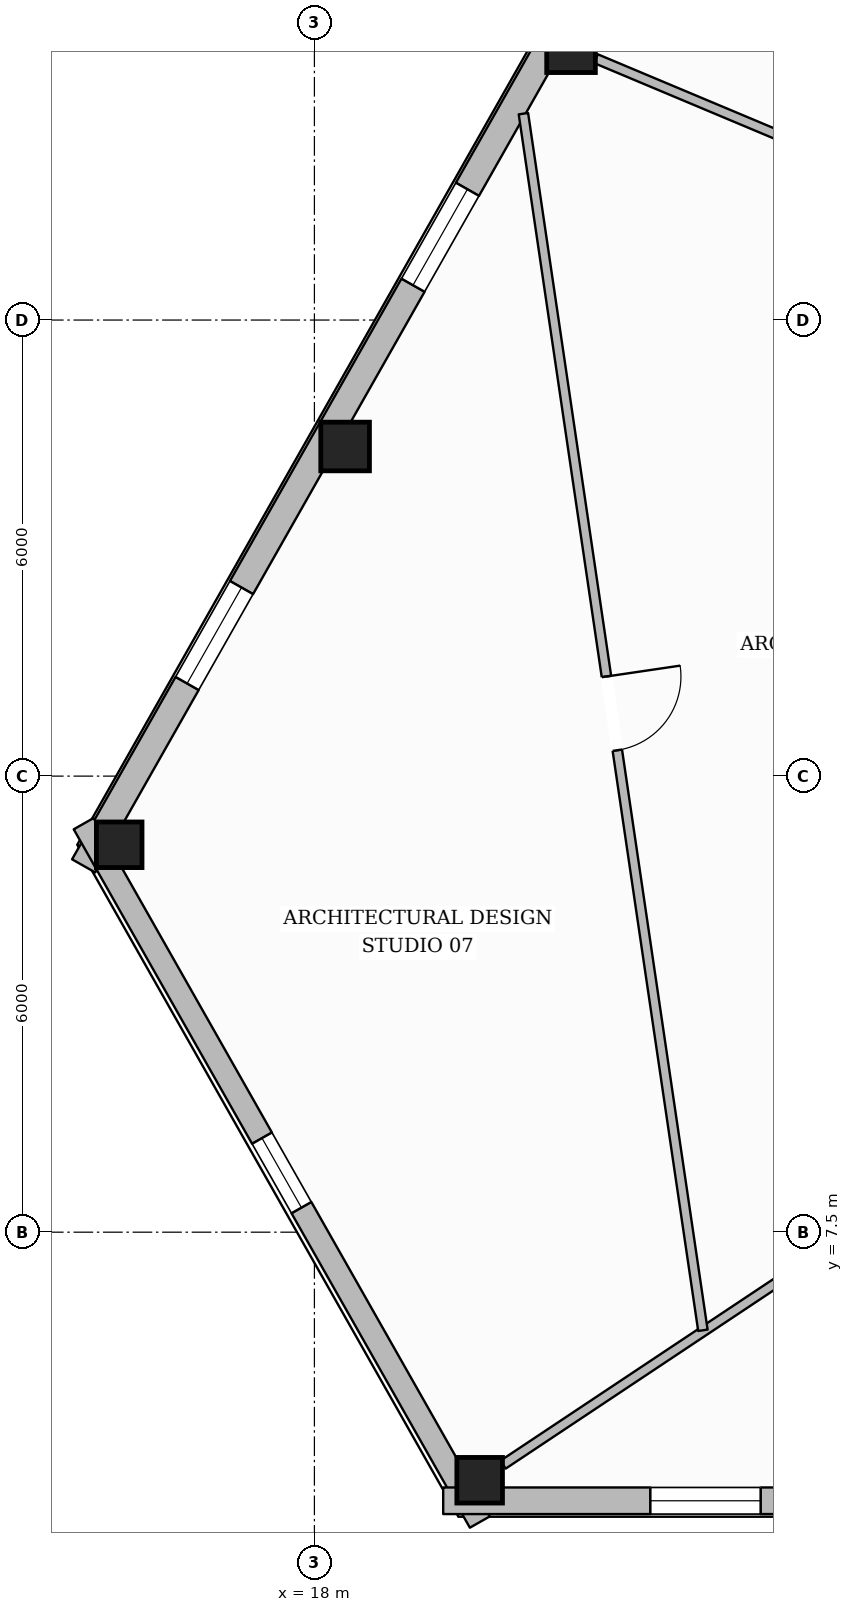
"""IFC4 building model, lengths in metres.
Left out: names, types, materials, properties, quantities, classifications, styles, units other than length and angle.
Written with IfcOpenShell. Run it as: python <this file> out.ifc"""

import sys

from ifc_helpers import new_model, si_unit, direction, frame, frame_2d, origin, origin_2d, place, context, subcontext, project, spatial, rectangle, hollow_rectangle, extrude, element, fill, save


model = new_model("IFC4")
c1 = context("Model", 3, precision=1e-05, world=origin(), true_north=direction((0.0, 1.0)))
c2 = subcontext(c1, "Body", "Model", "MODEL_VIEW")
j1 = project(units=[si_unit("LENGTHUNIT", "METRE"), si_unit("PLANEANGLEUNIT", "RADIAN")], contexts=[c1])
p1 = place(None, origin())
s1 = spatial("IfcSite", under=j1, at=p1, CompositionType="ELEMENT")
p2 = place(p1, origin())
s2 = spatial("IfcBuilding", under=s1, at=p2, CompositionType="ELEMENT")
p3 = place(p2, frame((0.0, 0.0, 165.0)))
s3 = spatial("IfcBuildingStorey", under=s2, at=p3, CompositionType="ELEMENT", Elevation=165.0)
for number, where, z_axis, x_axis in (
    (1, (21.376, 23.076, 0.0), (0.0, 0.0, 1.0), (1.0, 0.0, 0.0)),
    (2, (18.404, 17.836, 0.0), (0.0, 0.0, 1.0), (1.0, 0.0, 0.0)),
):
    element("IfcColumn", number, at=place(p3, frame(where, z_axis=z_axis, x_axis=x_axis)), inside=s3, PredefinedType="COLUMN", context=c2, shape_type="SweptSolid", body=[
        extrude(hollow_rectangle(XDim=0.64, YDim=0.64, WallThickness=0.028, at=origin_2d()), origin(), (0.0, 0.0, 1.0), 3.6),
    ])
for number, where, z_axis, x_axis in (
    (3, (15.432, 12.597, 0.0), (0.0, 0.0, 1.0), (1.0, 0.0, 0.0)),
    (4, (20.174, 4.237, 0.0), (0.0, 0.0, 1.0), (1.0, 0.0, 0.0)),
):
    element("IfcColumn", number, at=place(p3, frame(where, z_axis=z_axis, x_axis=x_axis)), inside=s3, PredefinedType="COLUMN", context=c2, shape_type="SweptSolid", body=[
        extrude(hollow_rectangle(XDim=0.6, YDim=0.6, WallThickness=0.028, at=origin_2d()), origin(), (0.0, 0.0, 1.0), 3.6),
    ])
p4 = place(p3, frame((14.964, 12.319, 0.0), z_axis=(0.0, 0.0, 1.0), x_axis=(0.493387150796, 0.869809817966, 0.0)))
e5 = element("IfcWall", 5, at=p4, inside=s3, PredefinedType="STANDARD", context=c2, shape_type="SweptSolid", body=[
    extrude(rectangle(XDim=37.096, YDim=0.35, at=frame_2d((18.548, 0.0))), origin(), (0.0, 0.0, 1.0), 3.132),
])
p5 = place(p4, frame((32.879, 0.0, 0.65)))
e6 = element("IfcOpeningElement", 6, at=p5, cuts=e5, PredefinedType="OPENING", context=c2, shape_type="SweptSolid", body=[
    extrude(rectangle(XDim=1.45, YDim=1.75, at=frame_2d((0.725, 0.875))), frame((0.0, 0.185, 0.0), z_axis=(0.0, -1.0, 0.0), x_axis=(1.0, 0.0, 0.0)), (0.0, 0.0, 1.0), 0.37),
])
p6 = place(p4, frame((26.855, 0.0, 0.65)))
e7 = element("IfcOpeningElement", 7, at=p6, cuts=e5, PredefinedType="OPENING", context=c2, shape_type="SweptSolid", body=[
    extrude(rectangle(XDim=1.45, YDim=1.75, at=frame_2d((0.725, 0.875))), frame((0.0, 0.185, 0.0), z_axis=(0.0, -1.0, 0.0), x_axis=(1.0, 0.0, 0.0)), (0.0, 0.0, 1.0), 0.37),
])
p7 = place(p4, frame((14.807, 0.0, 0.65)))
e8 = element("IfcOpeningElement", 8, at=p7, cuts=e5, PredefinedType="OPENING", context=c2, shape_type="SweptSolid", body=[
    extrude(rectangle(XDim=1.45, YDim=1.75, at=frame_2d((0.725, 0.875))), frame((0.0, 0.185, 0.0), z_axis=(0.0, -1.0, 0.0), x_axis=(1.0, 0.0, 0.0)), (0.0, 0.0, 1.0), 0.37),
])
p8 = place(p4, frame((8.783, 0.0, 0.65)))
e9 = element("IfcOpeningElement", 9, at=p8, cuts=e5, PredefinedType="OPENING", context=c2, shape_type="SweptSolid", body=[
    extrude(rectangle(XDim=1.45, YDim=1.75, at=frame_2d((0.725, 0.875))), frame((0.0, 0.185, 0.0), z_axis=(0.0, -1.0, 0.0), x_axis=(1.0, 0.0, 0.0)), (0.0, 0.0, 1.0), 0.37),
])
p9 = place(p4, frame((2.759, 0.0, 0.65)))
e10 = element("IfcOpeningElement", 10, at=p9, cuts=e5, PredefinedType="OPENING", context=c2, shape_type="SweptSolid", body=[
    extrude(rectangle(XDim=1.45, YDim=1.75, at=frame_2d((0.725, 0.875))), frame((0.0, 0.185, 0.0), z_axis=(0.0, -1.0, 0.0), x_axis=(1.0, 0.0, 0.0)), (0.0, 0.0, 1.0), 0.37),
])
p10 = place(p3, frame((20.176, 3.686, 0.0), z_axis=(0.0, 0.0, 1.0), x_axis=(-0.493371164069, 0.869818886013, 0.0)))
e11 = element("IfcWall", 11, at=p10, inside=s3, PredefinedType="STANDARD", context=c2, shape_type="SweptSolid", body=[
    extrude(rectangle(XDim=10.563, YDim=0.3, at=frame_2d((5.282, 0.0))), origin(), (0.0, 0.0, 1.0), 3.132),
])
p11 = place(p10, frame((4.757, 0.0, 0.65)))
e12 = element("IfcOpeningElement", 12, at=p11, cuts=e11, PredefinedType="OPENING", context=c2, shape_type="SweptSolid", body=[
    extrude(rectangle(XDim=1.05, YDim=1.7, at=frame_2d((0.525, 0.85))), frame((0.0, 0.16, 0.0), z_axis=(0.0, -1.0, 0.0), x_axis=(1.0, 0.0, 0.0)), (0.0, 0.0, 1.0), 0.32),
])
p12 = place(p3, frame((56.305, 3.967, 0.0), z_axis=(0.0, 0.0, 1.0), x_axis=(-1.0, 0.0, 0.0)))
e13 = element("IfcWall", 13, at=p12, inside=s3, PredefinedType="STANDARD", context=c2, shape_type="SweptSolid", body=[
    extrude(rectangle(XDim=36.611, YDim=0.35, at=frame_2d((18.305, 0.0))), origin(), (0.0, 0.0, 1.0), 3.132),
])
p13 = place(p12, frame((32.435, 0.0, 0.65)))
e14 = element("IfcOpeningElement", 14, at=p13, cuts=e13, PredefinedType="OPENING", context=c2, shape_type="SweptSolid", body=[
    extrude(rectangle(XDim=1.45, YDim=1.75, at=frame_2d((0.725, 0.875))), frame((0.0, 0.185, 0.0), z_axis=(0.0, -1.0, 0.0), x_axis=(1.0, 0.0, 0.0)), (0.0, 0.0, 1.0), 0.37),
])
p14 = place(p12, frame((26.493, 0.0, 0.65)))
e15 = element("IfcOpeningElement", 15, at=p14, cuts=e13, PredefinedType="OPENING", context=c2, shape_type="SweptSolid", body=[
    extrude(rectangle(XDim=1.45, YDim=1.75, at=frame_2d((0.725, 0.875))), frame((0.0, 0.185, 0.0), z_axis=(0.0, -1.0, 0.0), x_axis=(1.0, 0.0, 0.0)), (0.0, 0.0, 1.0), 0.37),
])
p15 = place(p12, frame((14.61, 0.0, 0.65)))
e16 = element("IfcOpeningElement", 16, at=p15, cuts=e13, PredefinedType="OPENING", context=c2, shape_type="SweptSolid", body=[
    extrude(rectangle(XDim=1.45, YDim=1.75, at=frame_2d((0.725, 0.875))), frame((0.0, 0.185, 0.0), z_axis=(0.0, -1.0, 0.0), x_axis=(1.0, 0.0, 0.0)), (0.0, 0.0, 1.0), 0.37),
])
p16 = place(p12, frame((8.667, 0.0, 0.65)))
e17 = element("IfcOpeningElement", 17, at=p16, cuts=e13, PredefinedType="OPENING", context=c2, shape_type="SweptSolid", body=[
    extrude(rectangle(XDim=1.45, YDim=1.75, at=frame_2d((0.725, 0.875))), frame((0.0, 0.185, 0.0), z_axis=(0.0, -1.0, 0.0), x_axis=(1.0, 0.0, 0.0)), (0.0, 0.0, 1.0), 0.37),
])
p17 = place(p12, frame((2.726, 0.0, 0.65)))
e18 = element("IfcOpeningElement", 18, at=p17, cuts=e13, PredefinedType="OPENING", context=c2, shape_type="SweptSolid", body=[
    extrude(rectangle(XDim=1.45, YDim=1.75, at=frame_2d((0.725, 0.875))), frame((0.0, 0.185, 0.0), z_axis=(0.0, -1.0, 0.0), x_axis=(1.0, 0.0, 0.0)), (0.0, 0.0, 1.0), 0.37),
])
p18 = place(p3, frame((25.979, 21.144, 0.0), z_axis=(0.0, 0.0, 1.0), x_axis=(-0.922095611861, 0.38696212035, 0.0)))
e19 = element("IfcWall", 19, at=p18, inside=s3, PredefinedType="PARTITIONING", context=c2, shape_type="SweptSolid", body=[
    extrude(rectangle(XDim=4.637, YDim=0.125, at=frame_2d((2.318, 0.0))), origin(), (0.0, 0.0, 1.0), 3.6),
])
p19 = place(p3, frame((25.979, 8.1, 0.0), z_axis=(0.0, 0.0, 1.0), x_axis=(-0.832482321267, -0.554051608407, 0.0)))
e20 = element("IfcWall", 20, at=p19, inside=s3, PredefinedType="PARTITIONING", context=c2, shape_type="SweptSolid", body=[
    extrude(rectangle(XDim=6.604, YDim=0.125, at=frame_2d((3.302, 0.0))), origin(), (0.0, 0.0, 1.0), 3.141),
])
p20 = place(p3, frame((20.75, 22.215, 0.0), z_axis=(0.0, 0.0, 1.0), x_axis=(0.145949252276, -0.989292078084, 0.0)))
e21 = element("IfcWall", 21, at=p20, inside=s3, PredefinedType="PARTITIONING", context=c2, shape_type="SweptSolid", body=[
    extrude(rectangle(XDim=16.179, YDim=0.125, at=frame_2d((8.09, 0.0))), origin(), (0.0, 0.0, 1.0), 3.339),
])
p21 = place(p20, frame((7.485, 0.0, 0.0)))
e22 = element("IfcOpeningElement", 22, at=p21, cuts=e21, PredefinedType="OPENING", context=c2, shape_type="SweptSolid", body=[
    extrude(rectangle(XDim=0.98, YDim=2.15, at=frame_2d((0.49, 1.075))), frame((0.0, 0.073, 0.0), z_axis=(0.0, -1.0, 0.0), x_axis=(1.0, 0.0, 0.0)), (0.0, 0.0, 1.0), 0.145),
])
p22 = place(p8, origin())
e23 = element("IfcWindow", 23, at=p22, inside=s3, PartitioningType="SINGLE_PANEL", PredefinedType="WINDOW", context=c2, shape_type="SweptSolid", body=[
    extrude(rectangle(XDim=1.45, YDim=1.75, at=frame_2d((0.725, 0.875))), frame((0.0, 0.03, 0.0), z_axis=(0.0, -1.0, 0.0), x_axis=(1.0, 0.0, 0.0)), (0.0, 0.0, 1.0), 0.06),
])
fill(e9, e23)
p23 = place(p9, origin())
e24 = element("IfcWindow", 24, at=p23, inside=s3, PartitioningType="SINGLE_PANEL", PredefinedType="WINDOW", context=c2, shape_type="SweptSolid", body=[
    extrude(rectangle(XDim=1.45, YDim=1.75, at=frame_2d((0.725, 0.875))), frame((0.0, 0.03, 0.0), z_axis=(0.0, -1.0, 0.0), x_axis=(1.0, 0.0, 0.0)), (0.0, 0.0, 1.0), 0.06),
])
fill(e10, e24)
p24 = place(p13, origin())
e25 = element("IfcWindow", 25, at=p24, inside=s3, PartitioningType="SINGLE_PANEL", PredefinedType="WINDOW", context=c2, shape_type="SweptSolid", body=[
    extrude(rectangle(XDim=1.45, YDim=1.75, at=frame_2d((0.725, 0.875))), frame((0.0, 0.03, 0.0), z_axis=(0.0, -1.0, 0.0), x_axis=(1.0, 0.0, 0.0)), (0.0, 0.0, 1.0), 0.06),
])
fill(e14, e25)
p25 = place(p11, origin())
e26 = element("IfcWindow", 26, at=p25, inside=s3, PartitioningType="SINGLE_PANEL", PredefinedType="WINDOW", context=c2, shape_type="SweptSolid", body=[
    extrude(rectangle(XDim=1.05, YDim=1.7, at=frame_2d((0.525, 0.85))), frame((0.0, 0.03, 0.0), z_axis=(0.0, -1.0, 0.0), x_axis=(1.0, 0.0, 0.0)), (0.0, 0.0, 1.0), 0.06),
])
fill(e12, e26)
p26 = place(p21, origin())
e27 = element("IfcDoor", 27, at=p26, inside=s3, OperationType="SINGLE_SWING_LEFT", PredefinedType="DOOR", context=c2, shape_type="SweptSolid", body=[
    extrude(rectangle(XDim=0.98, YDim=2.15, at=frame_2d((0.49, 1.075))), frame((0.0, 0.025, 0.0), z_axis=(0.0, -1.0, 0.0), x_axis=(1.0, 0.0, 0.0)), (0.0, 0.0, 1.0), 0.05),
])
fill(e22, e27)
save(model, sys.argv[1])
